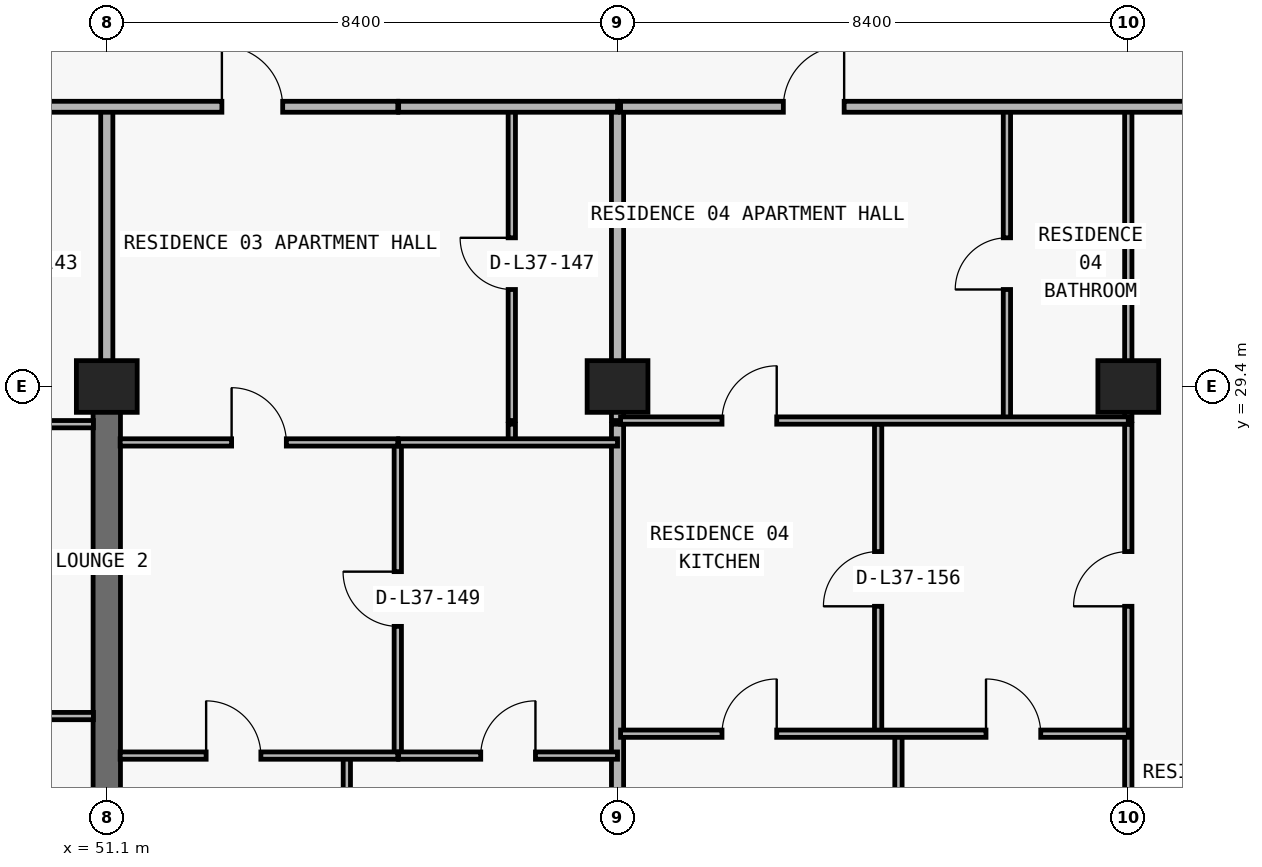
"""IFC4 building model, lengths in metres.
Left out: names, types, materials, properties, quantities, classifications, styles, units other than length and angle.
Written with IfcOpenShell. Run it as: python <this file> out.ifc"""

import sys

from ifc_helpers import new_model, si_unit, direction, frame, frame_2d, origin, origin_2d, place, context, subcontext, project, spatial, rectangle, extrude, element, fill, save


model = new_model("IFC4")
c1 = context("Model", 3, precision=1e-05, world=origin(), true_north=direction((0.0, 1.0)))
c2 = subcontext(c1, "Body", "Model", "MODEL_VIEW")
j1 = project(units=[si_unit("LENGTHUNIT", "METRE"), si_unit("PLANEANGLEUNIT", "RADIAN")], contexts=[c1])
p1 = place(None, origin())
s1 = spatial("IfcSite", under=j1, at=p1, CompositionType="ELEMENT")
p2 = place(p1, origin())
s2 = spatial("IfcBuilding", under=s1, at=p2, CompositionType="ELEMENT")
p3 = place(p2, frame((0.0, 0.0, 135.6)))
s3 = spatial("IfcBuildingStorey", under=s2, at=p3, CompositionType="ELEMENT", Elevation=135.6)
for number, where, z_axis, x_axis in (
    (1, (51.1, 29.4, 0.0), (0.0, 0.0, 1.0), (1.0, 0.0, 0.0)),
    (2, (59.5, 29.4, 0.0), (0.0, 0.0, 1.0), (1.0, 0.0, 0.0)),
    (3, (67.9, 29.4, 0.0), (0.0, 0.0, 1.0), (1.0, 0.0, 0.0)),
):
    element("IfcColumn", number, at=place(p3, frame(where, z_axis=z_axis, x_axis=x_axis)), inside=s3, PredefinedType="COLUMN", context=c2, shape_type="SweptSolid", body=[
        extrude(rectangle(XDim=1.0, YDim=0.85, at=origin_2d()), origin(), (0.0, 0.0, 1.0), 3.05),
    ])
p4 = place(p3, frame((51.1, 20.8, 0.0), z_axis=(0.0, 0.0, 1.0), x_axis=(0.0, 1.0, 0.0)))
e4 = element("IfcWall", 4, at=p4, inside=s3, PredefinedType="SHEAR", context=c2, shape_type="SweptSolid", body=[
    extrude(rectangle(XDim=8.6, YDim=0.45, at=frame_2d((4.3, 0.0))), origin(), (0.0, 0.0, 1.0), 3.05),
])
p5 = place(p3, frame((51.1, 29.405, 0.0), z_axis=(0.0, 0.0, 1.0), x_axis=(0.0, 1.0, 0.0)))
e5 = element("IfcWall", 5, at=p5, inside=s3, PredefinedType="PARTITIONING", context=c2, shape_type="SweptSolid", body=[
    extrude(rectangle(XDim=4.595, YDim=0.2, at=frame_2d((2.297, 0.0))), origin(), (0.0, 0.0, 1.0), 2.335),
])
p6 = place(p3, frame((55.048, 8.84, 0.0), z_axis=(0.0, 0.0, 1.0), x_axis=(0.0, 1.0, 0.0)))
e6 = element("IfcWall", 6, at=p6, inside=s3, PredefinedType="PARTITIONING", context=c2, shape_type="SweptSolid", body=[
    extrude(rectangle(XDim=14.49, YDim=0.12, at=frame_2d((7.245, 0.0))), origin(), (0.0, 0.0, 1.0), 3.05),
])
p7 = place(p3, frame((55.886, 23.33, 0.0), z_axis=(0.0, 0.0, 1.0), x_axis=(0.0, 1.0, 0.0)))
e7 = element("IfcWall", 7, at=p7, inside=s3, PredefinedType="PARTITIONING", context=c2, shape_type="SweptSolid", body=[
    extrude(rectangle(XDim=5.15, YDim=0.12, at=frame_2d((2.575, 0.0))), origin(), (0.0, 0.0, 1.0), 3.05),
])
p8 = place(p7, frame((2.125, 0.0, 0.0)))
e8 = element("IfcOpeningElement", 8, at=p8, cuts=e7, PredefinedType="OPENING", context=c2, shape_type="SweptSolid", body=[
    extrude(rectangle(XDim=0.9, YDim=2.15, at=frame_2d((0.45, 1.075))), frame((0.0, 0.07, 0.0), z_axis=(0.0, -1.0, 0.0), x_axis=(1.0, 0.0, 0.0)), (0.0, 0.0, 1.0), 0.14),
])
p9 = place(p3, frame((57.761, 28.48, 0.0), z_axis=(0.0, 0.0, 1.0), x_axis=(0.0, 1.0, 0.0)))
e9 = element("IfcWall", 9, at=p9, inside=s3, PredefinedType="PARTITIONING", context=c2, shape_type="SweptSolid", body=[
    extrude(rectangle(XDim=0.3, YDim=0.12, at=frame_2d((0.15, 0.0))), origin(), (0.0, 0.0, 1.0), 3.05),
])
p10 = place(p3, frame((57.761, 28.84, 0.0), z_axis=(0.0, 0.0, 1.0), x_axis=(0.0, 1.0, 0.0)))
e10 = element("IfcWall", 10, at=p10, inside=s3, PredefinedType="PARTITIONING", context=c2, shape_type="SweptSolid", body=[
    extrude(rectangle(XDim=5.16, YDim=0.12, at=frame_2d((2.58, 0.0))), origin(), (0.0, 0.0, 1.0), 3.05),
])
p11 = place(p10, frame((2.155, 0.0, 0.0)))
e11 = element("IfcOpeningElement", 11, at=p11, cuts=e10, PredefinedType="OPENING", context=c2, shape_type="SweptSolid", body=[
    extrude(rectangle(XDim=0.85, YDim=2.1, at=frame_2d((0.425, 1.05))), frame((0.0, 0.07, 0.0), z_axis=(0.0, -1.0, 0.0), x_axis=(1.0, 0.0, 0.0)), (0.0, 0.0, 1.0), 0.14),
])
p12 = place(p3, frame((59.5, 8.84, 0.0), z_axis=(0.0, 0.0, 1.0), x_axis=(0.0, 1.0, 0.0)))
e12 = element("IfcWall", 12, at=p12, inside=s3, PredefinedType="PARTITIONING", context=c2, shape_type="SweptSolid", body=[
    extrude(rectangle(XDim=19.94, YDim=0.2, at=frame_2d((9.97, 0.0))), origin(), (0.0, 0.0, 1.0), 2.174),
])
p13 = place(p3, frame((59.5, 28.84, 0.0), z_axis=(0.0, 0.0, 1.0), x_axis=(0.0, 1.0, 0.0)))
e13 = element("IfcWall", 13, at=p13, inside=s3, PredefinedType="PARTITIONING", context=c2, shape_type="SweptSolid", body=[
    extrude(rectangle(XDim=5.16, YDim=0.2, at=frame_2d((2.58, 0.0))), origin(), (0.0, 0.0, 1.0), 2.174),
])
p14 = place(p3, frame((63.786, 23.69, 0.0), z_axis=(0.0, 0.0, 1.0), x_axis=(0.0, 1.0, 0.0)))
e14 = element("IfcWall", 14, at=p14, inside=s3, PredefinedType="PARTITIONING", context=c2, shape_type="SweptSolid", body=[
    extrude(rectangle(XDim=5.09, YDim=0.12, at=frame_2d((2.545, 0.0))), origin(), (0.0, 0.0, 1.0), 2.486),
])
p15 = place(p14, frame((2.095, 0.0, 0.0)))
e15 = element("IfcOpeningElement", 15, at=p15, cuts=e14, PredefinedType="OPENING", context=c2, shape_type="SweptSolid", body=[
    extrude(rectangle(XDim=0.9, YDim=2.15, at=frame_2d((0.45, 1.075))), frame((0.0, 0.07, 0.0), z_axis=(0.0, -1.0, 0.0), x_axis=(1.0, 0.0, 0.0)), (0.0, 0.0, 1.0), 0.14),
])
p16 = place(p3, frame((64.12, 8.84, 0.0), z_axis=(0.0, 0.0, 1.0), x_axis=(0.0, 1.0, 0.0)))
e16 = element("IfcWall", 16, at=p16, inside=s3, PredefinedType="PARTITIONING", context=c2, shape_type="SweptSolid", body=[
    extrude(rectangle(XDim=14.85, YDim=0.12, at=frame_2d((7.425, 0.0))), origin(), (0.0, 0.0, 1.0), 3.05),
])
p17 = place(p3, frame((65.904, 28.84, 0.0), z_axis=(0.0, 0.0, 1.0), x_axis=(0.0, 1.0, 0.0)))
e17 = element("IfcWall", 17, at=p17, inside=s3, PredefinedType="PARTITIONING", context=c2, shape_type="SweptSolid", body=[
    extrude(rectangle(XDim=5.16, YDim=0.12, at=frame_2d((2.58, 0.0))), origin(), (0.0, 0.0, 1.0), 2.679),
])
p18 = place(p17, frame((2.155, 0.0, 0.0)))
e18 = element("IfcOpeningElement", 18, at=p18, cuts=e17, PredefinedType="OPENING", context=c2, shape_type="SweptSolid", body=[
    extrude(rectangle(XDim=0.85, YDim=2.1, at=frame_2d((0.425, 1.05))), frame((0.0, 0.07, 0.0), z_axis=(0.0, -1.0, 0.0), x_axis=(1.0, 0.0, 0.0)), (0.0, 0.0, 1.0), 0.14),
])
p19 = place(p3, frame((67.9, 8.84, 0.0), z_axis=(0.0, 0.0, 1.0), x_axis=(0.0, 1.0, 0.0)))
e19 = element("IfcWall", 19, at=p19, inside=s3, PredefinedType="PARTITIONING", context=c2, shape_type="SweptSolid", body=[
    extrude(rectangle(XDim=19.94, YDim=0.12, at=frame_2d((9.97, 0.0))), origin(), (0.0, 0.0, 1.0), 2.174),
])
p20 = place(p19, frame((16.945, 0.0, 0.0)))
e20 = element("IfcOpeningElement", 20, at=p20, cuts=e19, PredefinedType="OPENING", context=c2, shape_type="SweptSolid", body=[
    extrude(rectangle(XDim=0.9, YDim=2.124, at=frame_2d((0.45, 1.062))), frame((0.0, 0.07, 0.0), z_axis=(0.0, -1.0, 0.0), x_axis=(1.0, 0.0, 0.0)), (0.0, 0.0, 1.0), 0.14),
])
p21 = place(p3, frame((67.9, 28.84, 0.0), z_axis=(0.0, 0.0, 1.0), x_axis=(0.0, 1.0, 0.0)))
e21 = element("IfcWall", 21, at=p21, inside=s3, PredefinedType="PARTITIONING", context=c2, shape_type="SweptSolid", body=[
    extrude(rectangle(XDim=5.16, YDim=0.12, at=frame_2d((2.58, 0.0))), origin(), (0.0, 0.0, 1.0), 2.174),
])
p22 = place(p3, frame((51.32, 23.33, 0.0), z_axis=(0.0, 0.0, 1.0), x_axis=(1.0, 0.0, 0.0)))
e22 = element("IfcWall", 22, at=p22, inside=s3, PredefinedType="PARTITIONING", context=c2, shape_type="SweptSolid", body=[
    extrude(rectangle(XDim=4.566, YDim=0.12, at=frame_2d((2.283, 0.0))), origin(), (0.0, 0.0, 1.0), 3.05),
])
p23 = place(p22, frame((1.414, 0.0, 0.0)))
e23 = element("IfcOpeningElement", 23, at=p23, cuts=e22, PredefinedType="OPENING", context=c2, shape_type="SweptSolid", body=[
    extrude(rectangle(XDim=0.9, YDim=2.15, at=frame_2d((0.45, 1.075))), frame((0.0, 0.07, 0.0), z_axis=(0.0, -1.0, 0.0), x_axis=(1.0, 0.0, 0.0)), (0.0, 0.0, 1.0), 0.14),
])
p24 = place(p3, frame((55.9, 23.33, 0.0), z_axis=(0.0, 0.0, 1.0), x_axis=(1.0, 0.0, 0.0)))
e24 = element("IfcWall", 24, at=p24, inside=s3, PredefinedType="PARTITIONING", context=c2, shape_type="SweptSolid", body=[
    extrude(rectangle(XDim=3.6, YDim=0.12, at=frame_2d((1.8, 0.0))), origin(), (0.0, 0.0, 1.0), 3.05),
])
p25 = place(p24, frame((1.35, 0.0, 0.0)))
e25 = element("IfcOpeningElement", 25, at=p25, cuts=e24, PredefinedType="OPENING", context=c2, shape_type="SweptSolid", body=[
    extrude(rectangle(XDim=0.9, YDim=2.15, at=frame_2d((0.45, 1.075))), frame((0.0, 0.07, 0.0), z_axis=(0.0, -1.0, 0.0), x_axis=(1.0, 0.0, 0.0)), (0.0, 0.0, 1.0), 0.14),
])
p26 = place(p3, frame((59.55, 23.69, 0.0), z_axis=(0.0, 0.0, 1.0), x_axis=(1.0, 0.0, 0.0)))
e26 = element("IfcWall", 26, at=p26, inside=s3, PredefinedType="PARTITIONING", context=c2, shape_type="SweptSolid", body=[
    extrude(rectangle(XDim=8.35, YDim=0.12, at=frame_2d((4.175, 0.0))), origin(), (0.0, 0.0, 1.0), 3.05),
])
p27 = place(p26, frame((1.668, 0.0, 0.0)))
e27 = element("IfcOpeningElement", 27, at=p27, cuts=e26, PredefinedType="OPENING", context=c2, shape_type="SweptSolid", body=[
    extrude(rectangle(XDim=0.9, YDim=2.15, at=frame_2d((0.45, 1.075))), frame((0.0, 0.07, 0.0), z_axis=(0.0, -1.0, 0.0), x_axis=(1.0, 0.0, 0.0)), (0.0, 0.0, 1.0), 0.14),
])
p28 = place(p26, frame((6.01, 0.0, 0.0)))
e28 = element("IfcOpeningElement", 28, at=p28, cuts=e26, PredefinedType="OPENING", context=c2, shape_type="SweptSolid", body=[
    extrude(rectangle(XDim=0.9, YDim=2.15, at=frame_2d((0.45, 1.075))), frame((0.0, 0.07, 0.0), z_axis=(0.0, -1.0, 0.0), x_axis=(1.0, 0.0, 0.0)), (0.0, 0.0, 1.0), 0.14),
])
p29 = place(p3, frame((42.7, 23.98, 0.0), z_axis=(0.0, 0.0, 1.0), x_axis=(1.0, 0.0, 0.0)))
e29 = element("IfcWall", 29, at=p29, inside=s3, PredefinedType="PARTITIONING", context=c2, shape_type="SweptSolid", body=[
    extrude(rectangle(XDim=8.18, YDim=0.12, at=frame_2d((4.09, 0.0))), origin(), (0.0, 0.0, 1.0), 3.05),
])
p30 = place(p29, frame((3.64, 0.0, 0.0)))
e30 = element("IfcOpeningElement", 30, at=p30, cuts=e29, PredefinedType="OPENING", context=c2, shape_type="SweptSolid", body=[
    extrude(rectangle(XDim=0.9, YDim=2.15, at=frame_2d((0.45, 1.075))), frame((0.0, 0.07, 0.0), z_axis=(0.0, -1.0, 0.0), x_axis=(1.0, 0.0, 0.0)), (0.0, 0.0, 1.0), 0.14),
])
p31 = place(p3, frame((51.32, 28.48, 0.0), z_axis=(0.0, 0.0, 1.0), x_axis=(1.0, 0.0, 0.0)))
e31 = element("IfcWall", 31, at=p31, inside=s3, PredefinedType="PARTITIONING", context=c2, shape_type="SweptSolid", body=[
    extrude(rectangle(XDim=4.566, YDim=0.12, at=frame_2d((2.283, 0.0))), origin(), (0.0, 0.0, 1.0), 3.05),
])
p32 = place(p31, frame((1.833, 0.0, 0.0)))
e32 = element("IfcOpeningElement", 32, at=p32, cuts=e31, PredefinedType="OPENING", context=c2, shape_type="SweptSolid", body=[
    extrude(rectangle(XDim=0.9, YDim=2.15, at=frame_2d((0.45, 1.075))), frame((0.0, 0.07, 0.0), z_axis=(0.0, -1.0, 0.0), x_axis=(1.0, 0.0, 0.0)), (0.0, 0.0, 1.0), 0.14),
])
p33 = place(p3, frame((55.9, 28.48, 0.0), z_axis=(0.0, 0.0, 1.0), x_axis=(1.0, 0.0, 0.0)))
e33 = element("IfcWall", 33, at=p33, inside=s3, PredefinedType="PARTITIONING", context=c2, shape_type="SweptSolid", body=[
    extrude(rectangle(XDim=3.6, YDim=0.12, at=frame_2d((1.8, 0.0))), origin(), (0.0, 0.0, 1.0), 3.05),
])
p34 = place(p3, frame((42.7, 28.78, 0.0), z_axis=(0.0, 0.0, 1.0), x_axis=(1.0, 0.0, 0.0)))
e34 = element("IfcWall", 34, at=p34, inside=s3, PredefinedType="PARTITIONING", context=c2, shape_type="SweptSolid", body=[
    extrude(rectangle(XDim=8.18, YDim=0.12, at=frame_2d((4.09, 0.0))), origin(), (0.0, 0.0, 1.0), 3.05),
])
p35 = place(p34, frame((2.831, 0.0, 0.0)))
e35 = element("IfcOpeningElement", 35, at=p35, cuts=e34, PredefinedType="OPENING", context=c2, shape_type="SweptSolid", body=[
    extrude(rectangle(XDim=0.9, YDim=2.15, at=frame_2d((0.45, 1.075))), frame((0.0, 0.07, 0.0), z_axis=(0.0, -1.0, 0.0), x_axis=(1.0, 0.0, 0.0)), (0.0, 0.0, 1.0), 0.14),
])
p36 = place(p3, frame((59.55, 28.84, 0.0), z_axis=(0.0, 0.0, 1.0), x_axis=(1.0, 0.0, 0.0)))
e36 = element("IfcWall", 36, at=p36, inside=s3, PredefinedType="PARTITIONING", context=c2, shape_type="SweptSolid", body=[
    extrude(rectangle(XDim=8.35, YDim=0.12, at=frame_2d((4.175, 0.0))), origin(), (0.0, 0.0, 1.0), 3.05),
])
p37 = place(p36, frame((1.668, 0.0, 0.0)))
e37 = element("IfcOpeningElement", 37, at=p37, cuts=e36, PredefinedType="OPENING", context=c2, shape_type="SweptSolid", body=[
    extrude(rectangle(XDim=0.9, YDim=2.15, at=frame_2d((0.45, 1.075))), frame((0.0, 0.07, 0.0), z_axis=(0.0, -1.0, 0.0), x_axis=(1.0, 0.0, 0.0)), (0.0, 0.0, 1.0), 0.14),
])
p38 = place(p3, frame((18.3, 34.0, 0.0), z_axis=(0.0, 0.0, 1.0), x_axis=(1.0, 0.0, 0.0)))
e38 = element("IfcWall", 38, at=p38, inside=s3, PredefinedType="PARTITIONING", context=c2, shape_type="SweptSolid", body=[
    extrude(rectangle(XDim=37.586, YDim=0.18, at=frame_2d((18.793, 0.0))), origin(), (0.0, 0.0, 1.0), 3.05),
])
p39 = place(p38, frame((11.162, 0.0, 0.0)))
e39 = element("IfcOpeningElement", 39, at=p39, cuts=e38, PredefinedType="OPENING", context=c2, shape_type="SweptSolid", body=[
    extrude(rectangle(XDim=1.0, YDim=2.2, at=frame_2d((0.5, 1.1))), frame((0.0, 0.1, 0.0), z_axis=(0.0, -1.0, 0.0), x_axis=(1.0, 0.0, 0.0)), (0.0, 0.0, 1.0), 0.2),
])
p40 = place(p38, frame((34.693, 0.0, 0.0)))
e40 = element("IfcOpeningElement", 40, at=p40, cuts=e38, PredefinedType="OPENING", context=c2, shape_type="SweptSolid", body=[
    extrude(rectangle(XDim=1.0, YDim=2.2, at=frame_2d((0.5, 1.1))), frame((0.0, 0.1, 0.0), z_axis=(0.0, -1.0, 0.0), x_axis=(1.0, 0.0, 0.0)), (0.0, 0.0, 1.0), 0.2),
])
p41 = place(p3, frame((55.9, 34.0, 0.0), z_axis=(0.0, 0.0, 1.0), x_axis=(1.0, 0.0, 0.0)))
e41 = element("IfcWall", 41, at=p41, inside=s3, PredefinedType="PARTITIONING", context=c2, shape_type="SweptSolid", body=[
    extrude(rectangle(XDim=3.6, YDim=0.18, at=frame_2d((1.8, 0.0))), origin(), (0.0, 0.0, 1.0), 3.05),
])
p42 = place(p3, frame((59.55, 34.0, 0.0), z_axis=(0.0, 0.0, 1.0), x_axis=(1.0, 0.0, 0.0)))
e42 = element("IfcWall", 42, at=p42, inside=s3, PredefinedType="PARTITIONING", context=c2, shape_type="SweptSolid", body=[
    extrude(rectangle(XDim=10.55, YDim=0.18, at=frame_2d((5.275, 0.0))), origin(), (0.0, 0.0, 1.0), 3.05),
])
p43 = place(p42, frame((2.677, 0.0, 0.0)))
e43 = element("IfcOpeningElement", 43, at=p43, cuts=e42, PredefinedType="OPENING", context=c2, shape_type="SweptSolid", body=[
    extrude(rectangle(XDim=1.0, YDim=2.2, at=frame_2d((0.5, 1.1))), frame((0.0, 0.1, 0.0), z_axis=(0.0, -1.0, 0.0), x_axis=(1.0, 0.0, 0.0)), (0.0, 0.0, 1.0), 0.2),
])
p44 = place(p40, origin())
e44 = element("IfcDoor", 44, at=p44, inside=s3, OperationType="SINGLE_SWING_LEFT", PredefinedType="DOOR", context=c2, shape_type="SweptSolid", body=[
    extrude(rectangle(XDim=1.0, YDim=2.2, at=frame_2d((0.5, 1.1))), frame((0.0, 0.025, 0.0), z_axis=(0.0, -1.0, 0.0), x_axis=(1.0, 0.0, 0.0)), (0.0, 0.0, 1.0), 0.05),
])
fill(e40, e44)
p45 = place(p11, origin())
e45 = element("IfcDoor", 45, at=p45, inside=s3, OperationType="SINGLE_SWING_RIGHT", PredefinedType="DOOR", context=c2, shape_type="SweptSolid", body=[
    extrude(rectangle(XDim=0.85, YDim=2.1, at=frame_2d((0.425, 1.05))), frame((0.0, 0.025, 0.0), z_axis=(0.0, -1.0, 0.0), x_axis=(1.0, 0.0, 0.0)), (0.0, 0.0, 1.0), 0.05),
])
fill(e11, e45)
p46 = place(p32, origin())
e46 = element("IfcDoor", 46, at=p46, inside=s3, OperationType="SINGLE_SWING_LEFT", PredefinedType="DOOR", context=c2, shape_type="SweptSolid", body=[
    extrude(rectangle(XDim=0.9, YDim=2.15, at=frame_2d((0.45, 1.075))), frame((0.0, 0.025, 0.0), z_axis=(0.0, -1.0, 0.0), x_axis=(1.0, 0.0, 0.0)), (0.0, 0.0, 1.0), 0.05),
])
fill(e32, e46)
p47 = place(p8, origin())
e47 = element("IfcDoor", 47, at=p47, inside=s3, OperationType="SINGLE_SWING_RIGHT", PredefinedType="DOOR", context=c2, shape_type="SweptSolid", body=[
    extrude(rectangle(XDim=0.9, YDim=2.15, at=frame_2d((0.45, 1.075))), frame((0.0, 0.025, 0.0), z_axis=(0.0, -1.0, 0.0), x_axis=(1.0, 0.0, 0.0)), (0.0, 0.0, 1.0), 0.05),
])
fill(e8, e47)
p48 = place(p23, origin())
e48 = element("IfcDoor", 48, at=p48, inside=s3, OperationType="SINGLE_SWING_LEFT", PredefinedType="DOOR", context=c2, shape_type="SweptSolid", body=[
    extrude(rectangle(XDim=0.9, YDim=2.15, at=frame_2d((0.45, 1.075))), frame((0.0, 0.025, 0.0), z_axis=(0.0, -1.0, 0.0), x_axis=(1.0, 0.0, 0.0)), (0.0, 0.0, 1.0), 0.05),
])
fill(e23, e48)
p49 = place(p25, origin())
e49 = element("IfcDoor", 49, at=p49, inside=s3, OperationType="SINGLE_SWING_RIGHT", PredefinedType="DOOR", context=c2, shape_type="SweptSolid", body=[
    extrude(rectangle(XDim=0.9, YDim=2.15, at=frame_2d((0.45, 1.075))), frame((0.0, 0.025, 0.0), z_axis=(0.0, -1.0, 0.0), x_axis=(1.0, 0.0, 0.0)), (0.0, 0.0, 1.0), 0.05),
])
fill(e25, e49)
p50 = place(p43, origin())
e50 = element("IfcDoor", 50, at=p50, inside=s3, OperationType="SINGLE_SWING_RIGHT", PredefinedType="DOOR", context=c2, shape_type="SweptSolid", body=[
    extrude(rectangle(XDim=1.0, YDim=2.2, at=frame_2d((0.5, 1.1))), frame((0.0, 0.025, 0.0), z_axis=(0.0, -1.0, 0.0), x_axis=(1.0, 0.0, 0.0)), (0.0, 0.0, 1.0), 0.05),
])
fill(e43, e50)
p51 = place(p18, origin())
e51 = element("IfcDoor", 51, at=p51, inside=s3, OperationType="SINGLE_SWING_LEFT", PredefinedType="DOOR", context=c2, shape_type="SweptSolid", body=[
    extrude(rectangle(XDim=0.85, YDim=2.1, at=frame_2d((0.425, 1.05))), frame((0.0, 0.025, 0.0), z_axis=(0.0, -1.0, 0.0), x_axis=(1.0, 0.0, 0.0)), (0.0, 0.0, 1.0), 0.05),
])
fill(e18, e51)
p52 = place(p37, origin())
e52 = element("IfcDoor", 52, at=p52, inside=s3, OperationType="SINGLE_SWING_RIGHT", PredefinedType="DOOR", context=c2, shape_type="SweptSolid", body=[
    extrude(rectangle(XDim=0.9, YDim=2.15, at=frame_2d((0.45, 1.075))), frame((0.0, 0.025, 0.0), z_axis=(0.0, -1.0, 0.0), x_axis=(1.0, 0.0, 0.0)), (0.0, 0.0, 1.0), 0.05),
])
fill(e37, e52)
p53 = place(p15, origin())
e53 = element("IfcDoor", 53, at=p53, inside=s3, OperationType="SINGLE_SWING_LEFT", PredefinedType="DOOR", context=c2, shape_type="SweptSolid", body=[
    extrude(rectangle(XDim=0.9, YDim=2.15, at=frame_2d((0.45, 1.075))), frame((0.0, 0.025, 0.0), z_axis=(0.0, -1.0, 0.0), x_axis=(1.0, 0.0, 0.0)), (0.0, 0.0, 1.0), 0.05),
])
fill(e15, e53)
p54 = place(p27, origin())
e54 = element("IfcDoor", 54, at=p54, inside=s3, OperationType="SINGLE_SWING_RIGHT", PredefinedType="DOOR", context=c2, shape_type="SweptSolid", body=[
    extrude(rectangle(XDim=0.9, YDim=2.15, at=frame_2d((0.45, 1.075))), frame((0.0, 0.025, 0.0), z_axis=(0.0, -1.0, 0.0), x_axis=(1.0, 0.0, 0.0)), (0.0, 0.0, 1.0), 0.05),
])
fill(e27, e54)
p55 = place(p28, origin())
e55 = element("IfcDoor", 55, at=p55, inside=s3, OperationType="SINGLE_SWING_LEFT", PredefinedType="DOOR", context=c2, shape_type="SweptSolid", body=[
    extrude(rectangle(XDim=0.9, YDim=2.15, at=frame_2d((0.45, 1.075))), frame((0.0, 0.025, 0.0), z_axis=(0.0, -1.0, 0.0), x_axis=(1.0, 0.0, 0.0)), (0.0, 0.0, 1.0), 0.05),
])
fill(e28, e55)
p56 = place(p20, origin())
e56 = element("IfcDoor", 56, at=p56, inside=s3, OperationType="SINGLE_SWING_LEFT", PredefinedType="DOOR", context=c2, shape_type="SweptSolid", body=[
    extrude(rectangle(XDim=0.9, YDim=2.124, at=frame_2d((0.45, 1.062))), frame((0.0, 0.025, 0.0), z_axis=(0.0, -1.0, 0.0), x_axis=(1.0, 0.0, 0.0)), (0.0, 0.0, 1.0), 0.05),
])
fill(e20, e56)
save(model, sys.argv[1])
